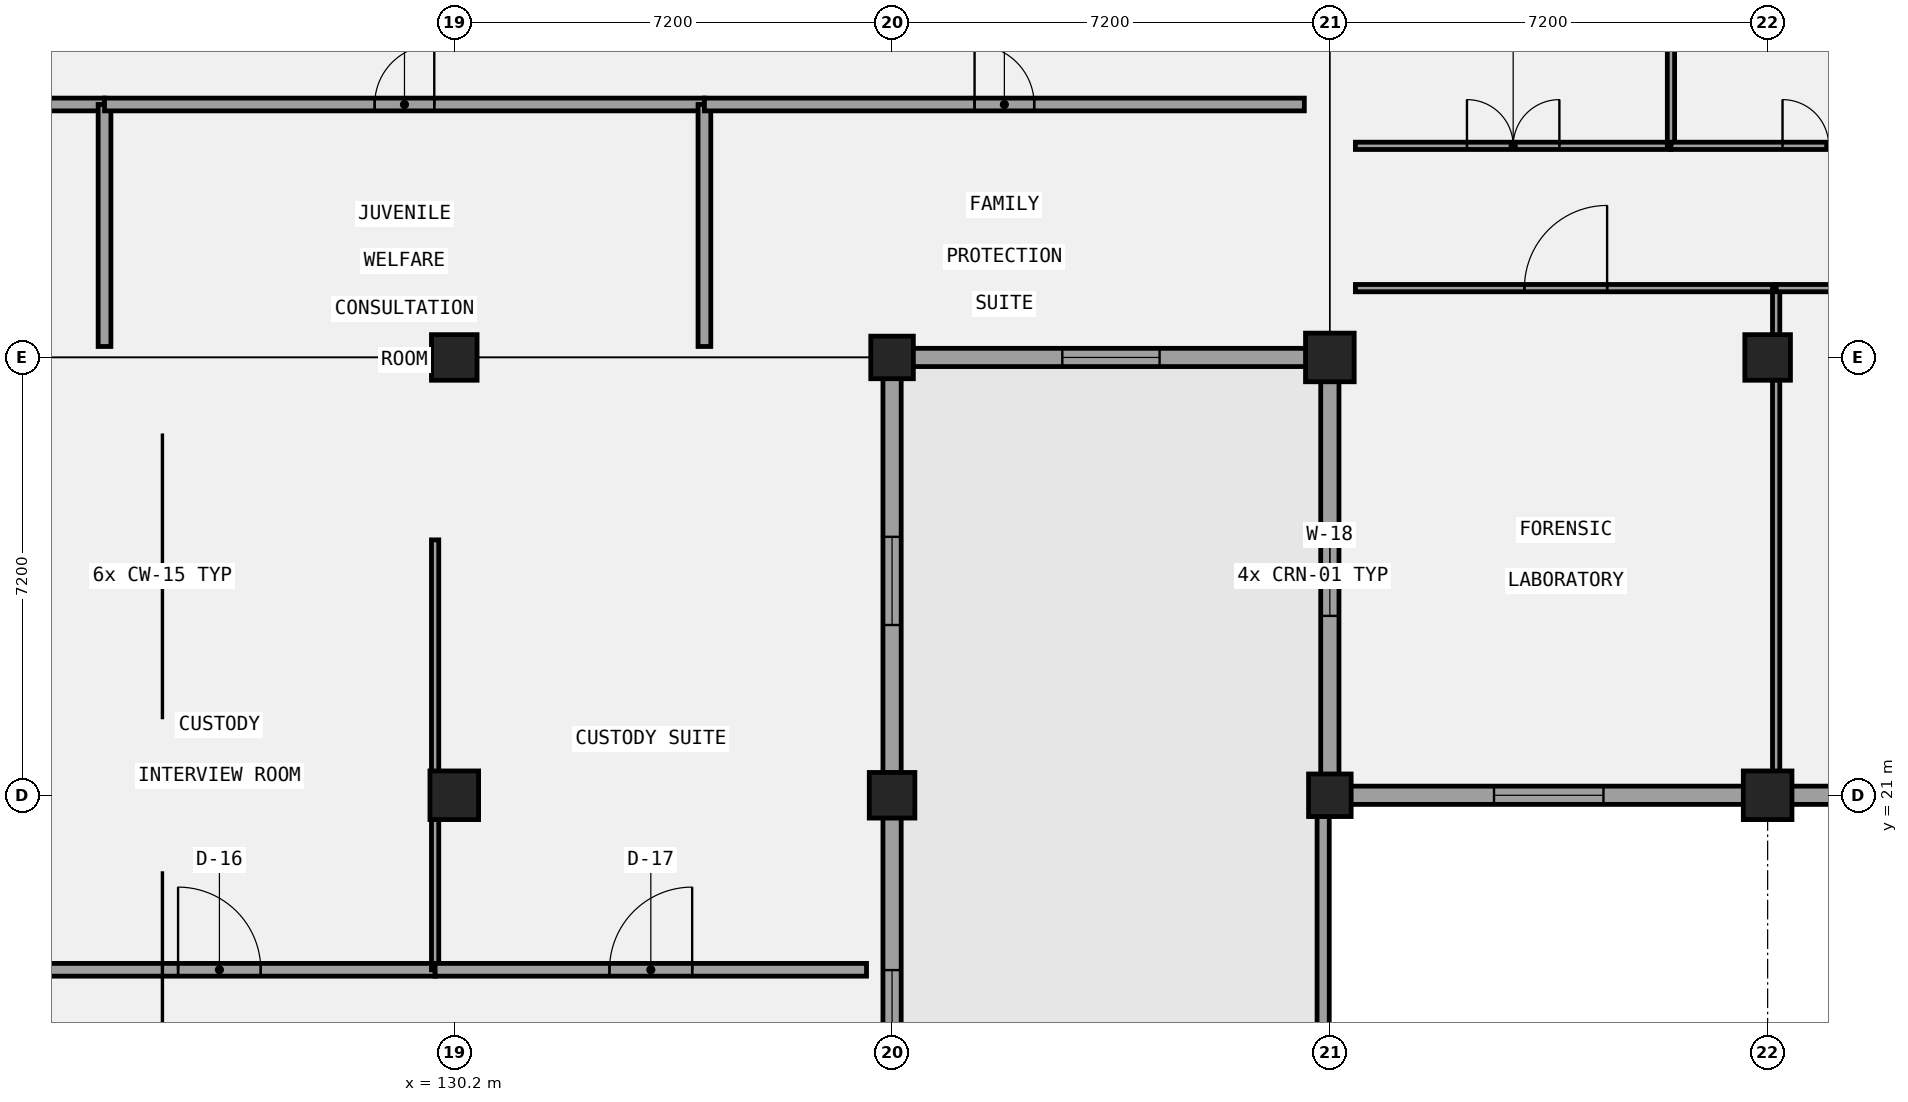
"""IFC4 building model, lengths in metres.
Left out: names, types, materials, properties, quantities, classifications, styles, units other than length and angle.
Written with IfcOpenShell. Run it as: python <this file> out.ifc"""

import sys

from ifc_helpers import new_model, si_unit, direction, frame, frame_2d, origin, origin_2d, place, context, subcontext, project, spatial, rectangle, extrude, element, fill, save


model = new_model("IFC4")
c1 = context("Model", 3, precision=1e-05, world=origin(), true_north=direction((0.0, 1.0)))
c2 = subcontext(c1, "Body", "Model", "MODEL_VIEW")
j1 = project(units=[si_unit("LENGTHUNIT", "METRE"), si_unit("PLANEANGLEUNIT", "RADIAN")], contexts=[c1])
p1 = place(None, origin())
s1 = spatial("IfcSite", under=j1, at=p1, CompositionType="ELEMENT")
p2 = place(p1, origin())
s2 = spatial("IfcBuilding", under=s1, at=p2, CompositionType="ELEMENT")
p3 = place(p2, frame((0.0, 0.0, 5.4)))
s3 = spatial("IfcBuildingStorey", under=s2, at=p3, CompositionType="ELEMENT", Elevation=5.4)
p4 = place(p3, frame((130.2, 21.0, 0.0), z_axis=(0.0, 0.0, 1.0), x_axis=(1.0, 0.0, 0.0)))
e1 = element("IfcColumn", 1, at=p4, inside=s3, PredefinedType="COLUMN", context=c2, shape_type="SweptSolid", body=[
    extrude(rectangle(XDim=0.8, YDim=0.8, at=origin_2d()), origin(), (0.0, 0.0, 1.0), 4.2),
])
for number, where, z_axis, x_axis in (
    (2, (130.2, 28.2, 0.0), (0.0, 0.0, 1.0), (1.0, 0.0, 0.0)),
    (3, (137.4, 21.0, 0.0), (0.0, 0.0, 1.0), (1.0, 0.0, 0.0)),
):
    element("IfcColumn", number, at=place(p3, frame(where, z_axis=z_axis, x_axis=x_axis)), inside=s3, PredefinedType="COLUMN", context=c2, shape_type="SweptSolid", body=[
        extrude(rectangle(XDim=0.75, YDim=0.75, at=origin_2d()), origin(), (0.0, 0.0, 1.0), 4.2),
    ])
for number, where, z_axis, x_axis in (
    (4, (137.4, 28.2, 0.0), (0.0, 0.0, 1.0), (1.0, 0.0, 0.0)),
    (5, (144.6, 21.0, 0.0), (0.0, 0.0, 1.0), (1.0, 0.0, 0.0)),
):
    element("IfcColumn", number, at=place(p3, frame(where, z_axis=z_axis, x_axis=x_axis)), inside=s3, PredefinedType="COLUMN", context=c2, shape_type="SweptSolid", body=[
        extrude(rectangle(XDim=0.7, YDim=0.7, at=origin_2d()), origin(), (0.0, 0.0, 1.0), 4.2),
    ])
for number, where, z_axis, x_axis in (
    (6, (144.6, 28.2, 0.0), (0.0, 0.0, 1.0), (1.0, 0.0, 0.0)),
    (7, (151.8, 21.0, 0.0), (0.0, 0.0, 1.0), (1.0, 0.0, 0.0)),
):
    element("IfcColumn", number, at=place(p3, frame(where, z_axis=z_axis, x_axis=x_axis)), inside=s3, PredefinedType="COLUMN", context=c2, shape_type="SweptSolid", body=[
        extrude(rectangle(XDim=0.8, YDim=0.8, at=origin_2d()), origin(), (0.0, 0.0, 1.0), 4.2),
    ])
p5 = place(p3, frame((151.8, 28.2, 0.0), z_axis=(0.0, 0.0, 1.0), x_axis=(1.0, 0.0, 0.0)))
e8 = element("IfcColumn", 8, at=p5, inside=s3, PredefinedType="COLUMN", context=c2, shape_type="SweptSolid", body=[
    extrude(rectangle(XDim=0.75, YDim=0.75, at=origin_2d()), origin(), (0.0, 0.0, 1.0), 4.2),
])
p6 = place(p3, frame((137.4, 6.75, 0.0), z_axis=(0.0, 0.0, 1.0), x_axis=(0.0, 1.0, 0.0)))
e9 = element("IfcWall", 9, at=p6, inside=s3, PredefinedType="SOLIDWALL", context=c2, shape_type="SweptSolid", body=[
    extrude(rectangle(XDim=21.3, YDim=0.3, at=frame_2d((10.65, 0.0))), origin(), (0.0, 0.0, 1.0), 2.92),
])
p7 = place(p6, frame((2.8, 0.0, 1.0)))
e10 = element("IfcOpeningElement", 10, at=p7, cuts=e9, PredefinedType="OPENING", context=c2, shape_type="SweptSolid", body=[
    extrude(rectangle(XDim=1.45, YDim=1.65, at=frame_2d((0.725, 0.825))), frame((0.0, 0.16, 0.0), z_axis=(0.0, -1.0, 0.0), x_axis=(1.0, 0.0, 0.0)), (0.0, 0.0, 1.0), 0.32),
])
p8 = place(p6, frame((9.925, 0.0, 1.0)))
e11 = element("IfcOpeningElement", 11, at=p8, cuts=e9, PredefinedType="OPENING", context=c2, shape_type="SweptSolid", body=[
    extrude(rectangle(XDim=1.45, YDim=1.65, at=frame_2d((0.725, 0.825))), frame((0.0, 0.16, 0.0), z_axis=(0.0, -1.0, 0.0), x_axis=(1.0, 0.0, 0.0)), (0.0, 0.0, 1.0), 0.32),
])
p9 = place(p6, frame((17.05, 0.0, 1.0)))
e12 = element("IfcOpeningElement", 12, at=p9, cuts=e9, PredefinedType="OPENING", context=c2, shape_type="SweptSolid", body=[
    extrude(rectangle(XDim=1.45, YDim=1.65, at=frame_2d((0.725, 0.825))), frame((0.0, 0.16, 0.0), z_axis=(0.0, -1.0, 0.0), x_axis=(1.0, 0.0, 0.0)), (0.0, 0.0, 1.0), 0.32),
])
p10 = place(p3, frame((137.25, 28.2, 0.0), z_axis=(0.0, 0.0, 1.0), x_axis=(1.0, 0.0, 0.0)))
e13 = element("IfcWall", 13, at=p10, inside=s3, PredefinedType="SOLIDWALL", context=c2, shape_type="SweptSolid", body=[
    extrude(rectangle(XDim=7.5, YDim=0.3, at=frame_2d((3.75, 0.0))), origin(), (0.0, 0.0, 1.0), 2.92),
])
p11 = place(p10, frame((2.95, 0.0, 1.0)))
e14 = element("IfcOpeningElement", 14, at=p11, cuts=e13, PredefinedType="OPENING", context=c2, shape_type="SweptSolid", body=[
    extrude(rectangle(XDim=1.6, YDim=1.4, at=frame_2d((0.8, 0.7))), frame((0.0, 0.16, 0.0), z_axis=(0.0, -1.0, 0.0), x_axis=(1.0, 0.0, 0.0)), (0.0, 0.0, 1.0), 0.32),
])
p12 = place(p3, frame((144.6, 28.05, 0.0), z_axis=(0.0, 0.0, 1.0), x_axis=(0.0, -1.0, 0.0)))
e15 = element("IfcWall", 15, at=p12, inside=s3, PredefinedType="SOLIDWALL", context=c2, shape_type="SweptSolid", body=[
    extrude(rectangle(XDim=6.9, YDim=0.3, at=frame_2d((3.45, 0.0))), origin(), (0.0, 0.0, 1.0), 3.27),
])
p13 = place(p12, frame((2.8, 0.0, 1.0)))
e16 = element("IfcOpeningElement", 16, at=p13, cuts=e15, PredefinedType="OPENING", context=c2, shape_type="SweptSolid", body=[
    extrude(rectangle(XDim=1.3, YDim=1.9, at=frame_2d((0.65, 0.95))), frame((0.0, 0.16, 0.0), z_axis=(0.0, -1.0, 0.0), x_axis=(1.0, 0.0, 0.0)), (0.0, 0.0, 1.0), 0.32),
])
p14 = place(p3, frame((144.45, 21.0, 0.0), z_axis=(0.0, 0.0, 1.0), x_axis=(1.0, 0.0, 0.0)))
e17 = element("IfcWall", 17, at=p14, inside=s3, PredefinedType="SOLIDWALL", context=c2, shape_type="SweptSolid", body=[
    extrude(rectangle(XDim=21.9, YDim=0.3, at=frame_2d((10.95, 0.0))), origin(), (0.0, 0.0, 1.0), 2.92),
])
p15 = place(p14, frame((2.85, 0.0, 1.0)))
e18 = element("IfcOpeningElement", 18, at=p15, cuts=e17, PredefinedType="OPENING", context=c2, shape_type="SweptSolid", body=[
    extrude(rectangle(XDim=1.8, YDim=1.4, at=frame_2d((0.9, 0.7))), frame((0.0, 0.16, 0.0), z_axis=(0.0, -1.0, 0.0), x_axis=(1.0, 0.0, 0.0)), (0.0, 0.0, 1.0), 0.32),
])
p16 = place(p14, frame((10.05, 0.0, 1.0)))
e19 = element("IfcOpeningElement", 19, at=p16, cuts=e17, PredefinedType="OPENING", context=c2, shape_type="SweptSolid", body=[
    extrude(rectangle(XDim=1.8, YDim=1.4, at=frame_2d((0.9, 0.7))), frame((0.0, 0.16, 0.0), z_axis=(0.0, -1.0, 0.0), x_axis=(1.0, 0.0, 0.0)), (0.0, 0.0, 1.0), 0.32),
])
p17 = place(p14, frame((17.25, 0.0, 1.0)))
e20 = element("IfcOpeningElement", 20, at=p17, cuts=e17, PredefinedType="OPENING", context=c2, shape_type="SweptSolid", body=[
    extrude(rectangle(XDim=1.8, YDim=1.4, at=frame_2d((0.9, 0.7))), frame((0.0, 0.16, 0.0), z_axis=(0.0, -1.0, 0.0), x_axis=(1.0, 0.0, 0.0)), (0.0, 0.0, 1.0), 0.32),
])
p18 = place(p3, frame((144.49, 20.7, 0.0), z_axis=(0.0, 0.0, 1.0), x_axis=(0.0, -1.0, 0.0)))
e21 = element("IfcWall", 21, at=p18, inside=s3, PredefinedType="PARAPET", context=c2, shape_type="SweptSolid", body=[
    extrude(rectangle(XDim=20.48, YDim=0.2, at=frame_2d((10.24, 0.0))), origin(), (0.0, 0.0, 1.0), 1.12),
])
p19 = place(p3, frame((114.582, 32.36, 0.0), z_axis=(0.0, 0.0, 1.0), x_axis=(1.0, 0.0, 0.0)))
e22 = element("IfcWall", 22, at=p19, inside=s3, PredefinedType="PARTITIONING", context=c2, shape_type="SweptSolid", body=[
    extrude(rectangle(XDim=9.866, YDim=0.21, at=frame_2d((4.933, 0.0))), origin(), (0.0, 0.0, 1.0), 3.92),
])
p20 = place(p19, frame((4.443, 0.0, 0.0)))
e23 = element("IfcOpeningElement", 23, at=p20, cuts=e22, PredefinedType="OPENING", context=c2, shape_type="SweptSolid", body=[
    extrude(rectangle(XDim=0.98, YDim=2.1, at=frame_2d((0.49, 1.05))), frame((0.0, 0.115, 0.0), z_axis=(0.0, -1.0, 0.0), x_axis=(1.0, 0.0, 0.0)), (0.0, 0.0, 1.0), 0.23),
])
p21 = place(p3, frame((124.448, 28.38, 0.0), z_axis=(0.0, 0.0, 1.0), x_axis=(0.0, 1.0, 0.0)))
e24 = element("IfcWall", 24, at=p21, inside=s3, PredefinedType="PARTITIONING", context=c2, shape_type="SweptSolid", body=[
    extrude(rectangle(XDim=3.98, YDim=0.21, at=frame_2d((1.99, 0.0))), origin(), (0.0, 0.0, 1.0), 3.92),
])
p22 = place(p3, frame((124.448, 32.36, 0.0), z_axis=(0.0, 0.0, 1.0), x_axis=(1.0, 0.0, 0.0)))
e25 = element("IfcWall", 25, at=p22, inside=s3, PredefinedType="PARTITIONING", context=c2, shape_type="SweptSolid", body=[
    extrude(rectangle(XDim=9.866, YDim=0.21, at=frame_2d((4.933, 0.0))), origin(), (0.0, 0.0, 1.0), 3.92),
])
p23 = place(p22, frame((4.443, 0.0, 0.0)))
e26 = element("IfcOpeningElement", 26, at=p23, cuts=e25, PredefinedType="OPENING", context=c2, shape_type="SweptSolid", body=[
    extrude(rectangle(XDim=0.98, YDim=2.22, at=frame_2d((0.49, 1.11))), frame((0.0, 0.115, 0.0), z_axis=(0.0, -1.0, 0.0), x_axis=(1.0, 0.0, 0.0)), (0.0, 0.0, 1.0), 0.23),
])
p24 = place(p3, frame((134.314, 28.38, 0.0), z_axis=(0.0, 0.0, 1.0), x_axis=(0.0, 1.0, 0.0)))
e27 = element("IfcWall", 27, at=p24, inside=s3, PredefinedType="PARTITIONING", context=c2, shape_type="SweptSolid", body=[
    extrude(rectangle(XDim=3.98, YDim=0.21, at=frame_2d((1.99, 0.0))), origin(), (0.0, 0.0, 1.0), 3.92),
])
p25 = place(p3, frame((134.314, 32.36, 0.0), z_axis=(0.0, 0.0, 1.0), x_axis=(1.0, 0.0, 0.0)))
e28 = element("IfcWall", 28, at=p25, inside=s3, PredefinedType="PARTITIONING", context=c2, shape_type="SweptSolid", body=[
    extrude(rectangle(XDim=9.866, YDim=0.21, at=frame_2d((4.933, 0.0))), origin(), (0.0, 0.0, 1.0), 3.92),
])
p26 = place(p25, frame((4.443, 0.0, 0.0)))
e29 = element("IfcOpeningElement", 29, at=p26, cuts=e28, PredefinedType="OPENING", context=c2, shape_type="SweptSolid", body=[
    extrude(rectangle(XDim=0.98, YDim=2.35, at=frame_2d((0.49, 1.175))), frame((0.0, 0.115, 0.0), z_axis=(0.0, -1.0, 0.0), x_axis=(1.0, 0.0, 0.0)), (0.0, 0.0, 1.0), 0.23),
])
p27 = place(p3, frame((145.02, 29.34, 0.0), z_axis=(0.0, 0.0, 1.0), x_axis=(1.0, 0.0, 0.0)))
e30 = element("IfcWall", 30, at=p27, inside=s3, PredefinedType="PARTITIONING", context=c2, shape_type="SweptSolid", body=[
    extrude(rectangle(XDim=6.92, YDim=0.12, at=frame_2d((3.46, 0.0))), origin(), (0.0, 0.0, 1.0), 3.92),
])
p28 = place(p27, frame((2.78, 0.0, 0.0)))
e31 = element("IfcOpeningElement", 31, at=p28, cuts=e30, PredefinedType="OPENING", context=c2, shape_type="SweptSolid", body=[
    extrude(rectangle(XDim=1.36, YDim=2.22, at=frame_2d((0.68, 1.11))), frame((0.0, 0.07, 0.0), z_axis=(0.0, -1.0, 0.0), x_axis=(1.0, 0.0, 0.0)), (0.0, 0.0, 1.0), 0.14),
])
p29 = place(p3, frame((151.94, 21.18, 0.0), z_axis=(0.0, 0.0, 1.0), x_axis=(0.0, 1.0, 0.0)))
e32 = element("IfcWall", 32, at=p29, inside=s3, PredefinedType="PARTITIONING", context=c2, shape_type="SweptSolid", body=[
    extrude(rectangle(XDim=8.16, YDim=0.12, at=frame_2d((4.08, 0.0))), origin(), (0.0, 0.0, 1.0), 3.17),
])
p30 = place(p3, frame((151.94, 29.34, 0.0), z_axis=(0.0, 0.0, 1.0), x_axis=(1.0, 0.0, 0.0)))
e33 = element("IfcWall", 33, at=p30, inside=s3, PredefinedType="PARTITIONING", context=c2, shape_type="SweptSolid", body=[
    extrude(rectangle(XDim=6.92, YDim=0.12, at=frame_2d((3.46, 0.0))), origin(), (0.0, 0.0, 1.0), 3.92),
])
p31 = place(p30, frame((2.78, 0.0, 0.0)))
e34 = element("IfcOpeningElement", 34, at=p31, cuts=e33, PredefinedType="OPENING", context=c2, shape_type="SweptSolid", body=[
    extrude(rectangle(XDim=1.36, YDim=2.35, at=frame_2d((0.68, 1.175))), frame((0.0, 0.07, 0.0), z_axis=(0.0, -1.0, 0.0), x_axis=(1.0, 0.0, 0.0)), (0.0, 0.0, 1.0), 0.14),
])
p32 = place(p3, frame((145.02, 31.68, 0.0), z_axis=(0.0, 0.0, 1.0), x_axis=(1.0, 0.0, 0.0)))
e35 = element("IfcWall", 35, at=p32, inside=s3, PredefinedType="PARTITIONING", context=c2, shape_type="SweptSolid", body=[
    extrude(rectangle(XDim=5.19, YDim=0.12, at=frame_2d((2.595, 0.0))), origin(), (0.0, 0.0, 1.0), 3.37),
])
p33 = place(p32, frame((1.835, 0.0, 0.0)))
e36 = element("IfcOpeningElement", 36, at=p33, cuts=e35, PredefinedType="OPENING", context=c2, shape_type="SweptSolid", body=[
    extrude(rectangle(XDim=1.52, YDim=2.22, at=frame_2d((0.76, 1.11))), frame((0.0, 0.07, 0.0), z_axis=(0.0, -1.0, 0.0), x_axis=(1.0, 0.0, 0.0)), (0.0, 0.0, 1.0), 0.14),
])
p34 = place(p3, frame((150.21, 31.68, 0.0), z_axis=(0.0, 0.0, 1.0), x_axis=(0.0, 1.0, 0.0)))
e37 = element("IfcWall", 37, at=p34, inside=s3, PredefinedType="PARTITIONING", context=c2, shape_type="SweptSolid", body=[
    extrude(rectangle(XDim=7.92, YDim=0.12, at=frame_2d((3.96, 0.0))), origin(), (0.0, 0.0, 1.0), 3.92),
])
p35 = place(p3, frame((150.21, 31.68, 0.0), z_axis=(0.0, 0.0, 1.0), x_axis=(1.0, 0.0, 0.0)))
e38 = element("IfcWall", 38, at=p35, inside=s3, PredefinedType="PARTITIONING", context=c2, shape_type="SweptSolid", body=[
    extrude(rectangle(XDim=5.19, YDim=0.12, at=frame_2d((2.595, 0.0))), origin(), (0.0, 0.0, 1.0), 3.37),
])
p36 = place(p35, frame((1.835, 0.0, 0.0)))
e39 = element("IfcOpeningElement", 39, at=p36, cuts=e38, PredefinedType="OPENING", context=c2, shape_type="SweptSolid", body=[
    extrude(rectangle(XDim=1.52, YDim=2.35, at=frame_2d((0.76, 1.175))), frame((0.0, 0.07, 0.0), z_axis=(0.0, -1.0, 0.0), x_axis=(1.0, 0.0, 0.0)), (0.0, 0.0, 1.0), 0.14),
])
p37 = place(p3, frame((122.79, 18.13, 0.0), z_axis=(0.0, 0.0, 1.0), x_axis=(1.0, 0.0, 0.0)))
e40 = element("IfcWall", 40, at=p37, inside=s3, PredefinedType="PARTITIONING", context=c2, shape_type="SweptSolid", body=[
    extrude(rectangle(XDim=7.095, YDim=0.21, at=frame_2d((3.547, 0.0))), origin(), (0.0, 0.0, 1.0), 3.92),
])
p38 = place(p37, frame((2.867, 0.0, 0.0)))
e41 = element("IfcOpeningElement", 41, at=p38, cuts=e40, PredefinedType="OPENING", context=c2, shape_type="SweptSolid", body=[
    extrude(rectangle(XDim=1.36, YDim=2.1, at=frame_2d((0.68, 1.05))), frame((0.0, 0.115, 0.0), z_axis=(0.0, -1.0, 0.0), x_axis=(1.0, 0.0, 0.0)), (0.0, 0.0, 1.0), 0.23),
])
p39 = place(p3, frame((129.885, 18.13, 0.0), z_axis=(0.0, 0.0, 1.0), x_axis=(0.0, 1.0, 0.0)))
e42 = element("IfcWall", 42, at=p39, inside=s3, PredefinedType="PARTITIONING", context=c2, shape_type="SweptSolid", body=[
    extrude(rectangle(XDim=7.07, YDim=0.12, at=frame_2d((3.535, 0.0))), origin(), (0.0, 0.0, 1.0), 2.92),
])
p40 = place(p3, frame((129.885, 18.13, 0.0), z_axis=(0.0, 0.0, 1.0), x_axis=(1.0, 0.0, 0.0)))
e43 = element("IfcWall", 43, at=p40, inside=s3, PredefinedType="PARTITIONING", context=c2, shape_type="SweptSolid", body=[
    extrude(rectangle(XDim=7.095, YDim=0.21, at=frame_2d((3.547, 0.0))), origin(), (0.0, 0.0, 1.0), 3.92),
])
p41 = place(p40, frame((2.867, 0.0, 0.0)))
e44 = element("IfcOpeningElement", 44, at=p41, cuts=e43, PredefinedType="OPENING", context=c2, shape_type="SweptSolid", body=[
    extrude(rectangle(XDim=1.36, YDim=2.22, at=frame_2d((0.68, 1.11))), frame((0.0, 0.115, 0.0), z_axis=(0.0, -1.0, 0.0), x_axis=(1.0, 0.0, 0.0)), (0.0, 0.0, 1.0), 0.23),
])
p42 = place(p8, origin())
e45 = element("IfcWindow", 45, at=p42, inside=s3, PartitioningType="SINGLE_PANEL", PredefinedType="WINDOW", context=c2, shape_type="SweptSolid", body=[
    extrude(rectangle(XDim=1.45, YDim=1.65, at=frame_2d((0.725, 0.825))), frame((0.0, 0.03, 0.0), z_axis=(0.0, -1.0, 0.0), x_axis=(1.0, 0.0, 0.0)), (0.0, 0.0, 1.0), 0.06),
])
fill(e11, e45)
p43 = place(p9, origin())
e46 = element("IfcWindow", 46, at=p43, inside=s3, PartitioningType="SINGLE_PANEL", PredefinedType="WINDOW", context=c2, shape_type="SweptSolid", body=[
    extrude(rectangle(XDim=1.45, YDim=1.65, at=frame_2d((0.725, 0.825))), frame((0.0, 0.03, 0.0), z_axis=(0.0, -1.0, 0.0), x_axis=(1.0, 0.0, 0.0)), (0.0, 0.0, 1.0), 0.06),
])
fill(e12, e46)
p44 = place(p11, origin())
e47 = element("IfcWindow", 47, at=p44, inside=s3, PartitioningType="SINGLE_PANEL", PredefinedType="WINDOW", context=c2, shape_type="SweptSolid", body=[
    extrude(rectangle(XDim=1.6, YDim=1.4, at=frame_2d((0.8, 0.7))), frame((0.0, 0.03, 0.0), z_axis=(0.0, -1.0, 0.0), x_axis=(1.0, 0.0, 0.0)), (0.0, 0.0, 1.0), 0.06),
])
fill(e14, e47)
p45 = place(p13, origin())
e48 = element("IfcWindow", 48, at=p45, inside=s3, PartitioningType="SINGLE_PANEL", PredefinedType="WINDOW", context=c2, shape_type="SweptSolid", body=[
    extrude(rectangle(XDim=1.3, YDim=1.9, at=frame_2d((0.65, 0.95))), frame((0.0, 0.03, 0.0), z_axis=(0.0, -1.0, 0.0), x_axis=(1.0, 0.0, 0.0)), (0.0, 0.0, 1.0), 0.06),
])
fill(e16, e48)
p46 = place(p15, origin())
e49 = element("IfcWindow", 49, at=p46, inside=s3, PartitioningType="SINGLE_PANEL", PredefinedType="WINDOW", context=c2, shape_type="SweptSolid", body=[
    extrude(rectangle(XDim=1.8, YDim=1.4, at=frame_2d((0.9, 0.7))), frame((0.0, 0.03, 0.0), z_axis=(0.0, -1.0, 0.0), x_axis=(1.0, 0.0, 0.0)), (0.0, 0.0, 1.0), 0.06),
])
fill(e18, e49)
p47 = place(p23, frame((0.98, 0.0, 0.0), z_axis=(0.0, 0.0, 1.0), x_axis=(-1.0, 0.0, 0.0)))
e50 = element("IfcDoor", 50, at=p47, inside=s3, OperationType="SINGLE_SWING_RIGHT", PredefinedType="DOOR", context=c2, shape_type="SweptSolid", body=[
    extrude(rectangle(XDim=0.98, YDim=2.22, at=frame_2d((0.49, 1.11))), frame((0.0, 0.025, 0.0), z_axis=(0.0, -1.0, 0.0), x_axis=(1.0, 0.0, 0.0)), (0.0, 0.0, 1.0), 0.05),
])
fill(e26, e50)
p48 = place(p26, frame((0.98, 0.0, 0.0), z_axis=(0.0, 0.0, 1.0), x_axis=(-1.0, 0.0, 0.0)))
e51 = element("IfcDoor", 51, at=p48, inside=s3, OperationType="SINGLE_SWING_LEFT", PredefinedType="DOOR", context=c2, shape_type="SweptSolid", body=[
    extrude(rectangle(XDim=0.98, YDim=2.35, at=frame_2d((0.49, 1.175))), frame((0.0, 0.025, 0.0), z_axis=(0.0, -1.0, 0.0), x_axis=(1.0, 0.0, 0.0)), (0.0, 0.0, 1.0), 0.05),
])
fill(e29, e51)
p49 = place(p28, frame((1.36, 0.0, 0.0), z_axis=(0.0, 0.0, 1.0), x_axis=(-1.0, 0.0, 0.0)))
e52 = element("IfcDoor", 52, at=p49, inside=s3, OperationType="SINGLE_SWING_RIGHT", PredefinedType="DOOR", context=c2, shape_type="SweptSolid", body=[
    extrude(rectangle(XDim=1.36, YDim=2.22, at=frame_2d((0.68, 1.11))), frame((0.0, 0.025, 0.0), z_axis=(0.0, -1.0, 0.0), x_axis=(1.0, 0.0, 0.0)), (0.0, 0.0, 1.0), 0.05),
])
fill(e31, e52)
p50 = place(p33, origin())
e53 = element("IfcDoor", 53, at=p50, inside=s3, OperationType="DOUBLE_DOOR_SINGLE_SWING", PredefinedType="DOOR", context=c2, shape_type="SweptSolid", body=[
    extrude(rectangle(XDim=1.52, YDim=2.22, at=frame_2d((0.76, 1.11))), frame((0.0, 0.025, 0.0), z_axis=(0.0, -1.0, 0.0), x_axis=(1.0, 0.0, 0.0)), (0.0, 0.0, 1.0), 0.05),
])
fill(e36, e53)
p51 = place(p36, origin())
e54 = element("IfcDoor", 54, at=p51, inside=s3, OperationType="DOUBLE_DOOR_SINGLE_SWING", PredefinedType="DOOR", context=c2, shape_type="SweptSolid", body=[
    extrude(rectangle(XDim=1.52, YDim=2.35, at=frame_2d((0.76, 1.175))), frame((0.0, 0.025, 0.0), z_axis=(0.0, -1.0, 0.0), x_axis=(1.0, 0.0, 0.0)), (0.0, 0.0, 1.0), 0.05),
])
fill(e39, e54)
p52 = place(p38, origin())
e55 = element("IfcDoor", 55, at=p52, inside=s3, OperationType="SINGLE_SWING_LEFT", PredefinedType="DOOR", context=c2, shape_type="SweptSolid", body=[
    extrude(rectangle(XDim=1.36, YDim=2.1, at=frame_2d((0.68, 1.05))), frame((0.0, 0.025, 0.0), z_axis=(0.0, -1.0, 0.0), x_axis=(1.0, 0.0, 0.0)), (0.0, 0.0, 1.0), 0.05),
])
fill(e41, e55)
p53 = place(p41, origin())
e56 = element("IfcDoor", 56, at=p53, inside=s3, OperationType="SINGLE_SWING_RIGHT", PredefinedType="DOOR", context=c2, shape_type="SweptSolid", body=[
    extrude(rectangle(XDim=1.36, YDim=2.22, at=frame_2d((0.68, 1.11))), frame((0.0, 0.025, 0.0), z_axis=(0.0, -1.0, 0.0), x_axis=(1.0, 0.0, 0.0)), (0.0, 0.0, 1.0), 0.05),
])
fill(e44, e56)
save(model, sys.argv[1])
